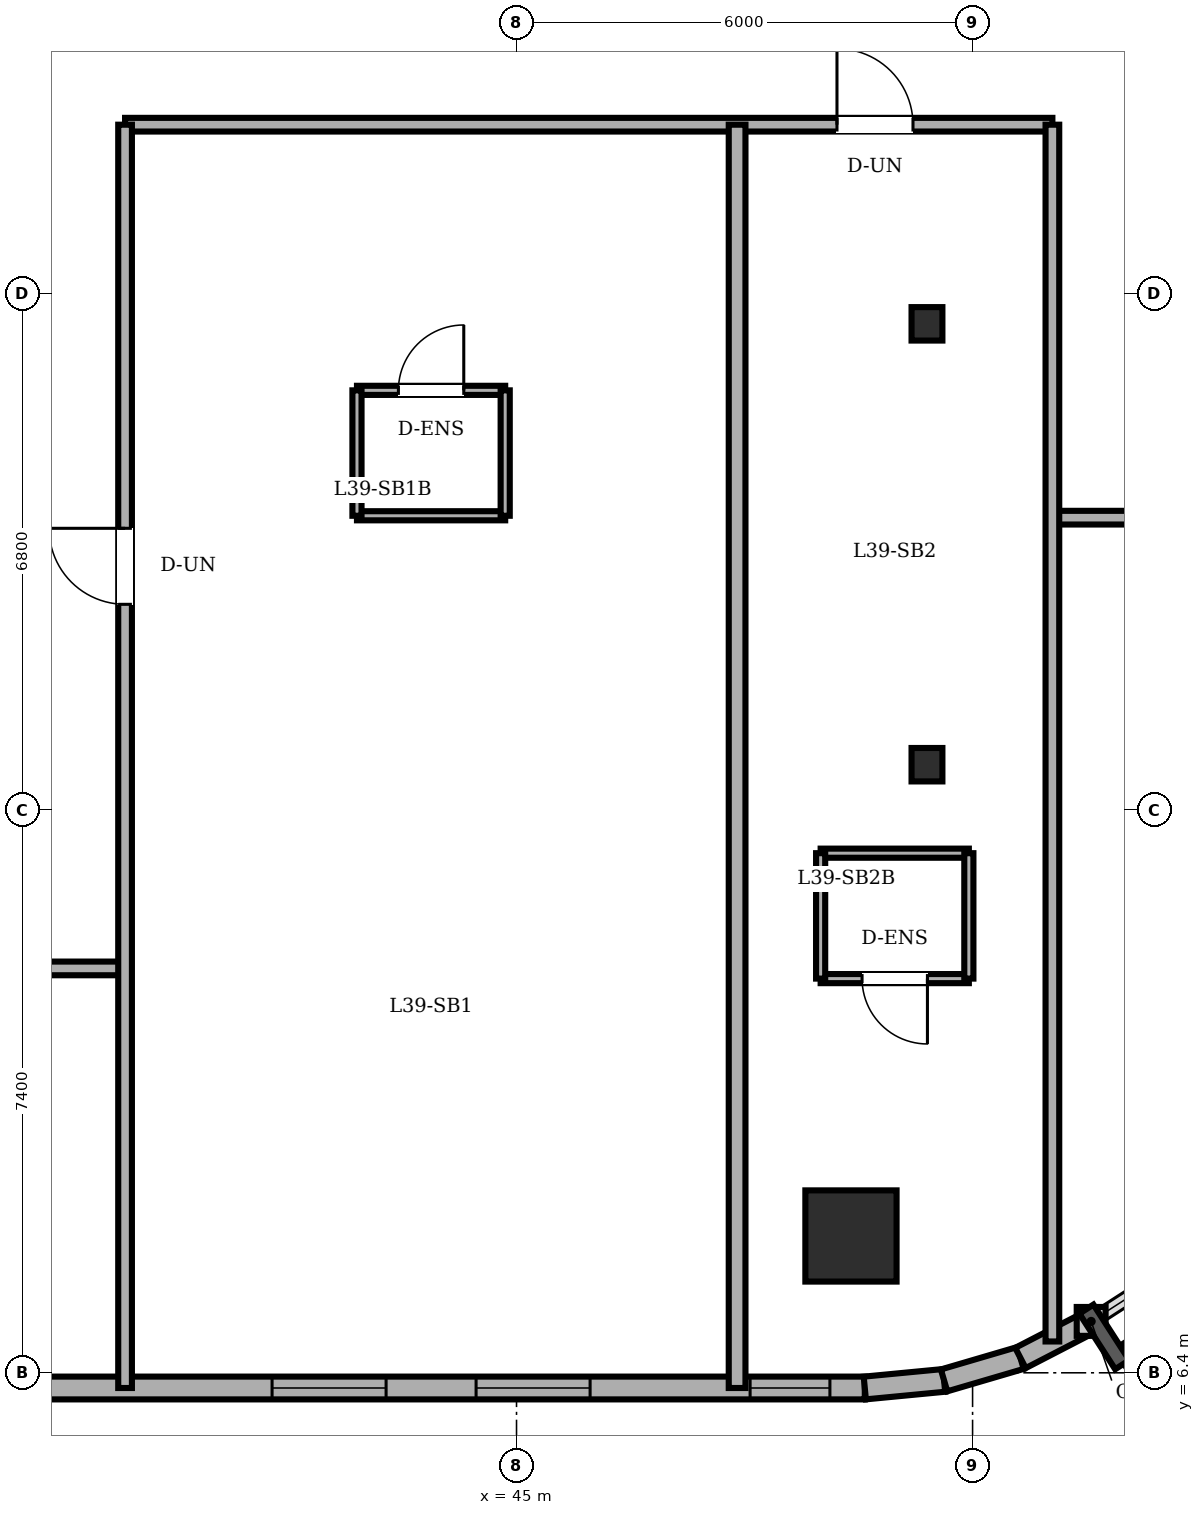
"""IFC4 building model, lengths in metres.
Left out: names, types, materials, properties, quantities, classifications, styles, units other than length and angle.
Written with IfcOpenShell. Run it as: python <this file> out.ifc"""

import sys

from ifc_helpers import new_model, si_unit, direction, frame, frame_2d, origin, origin_2d, place, context, subcontext, project, spatial, rectangle, circle, i_section, extrude, element, fill, save


model = new_model("IFC4")
c1 = context("Model", 3, precision=1e-05, world=origin(), true_north=direction((0.0, 1.0)))
c2 = subcontext(c1, "Body", "Model", "MODEL_VIEW")
j1 = project(units=[si_unit("LENGTHUNIT", "METRE"), si_unit("PLANEANGLEUNIT", "RADIAN")], contexts=[c1])
p1 = place(None, origin())
s1 = spatial("IfcSite", under=j1, at=p1, CompositionType="ELEMENT")
p2 = place(p1, origin())
s2 = spatial("IfcBuilding", under=s1, at=p2, CompositionType="ELEMENT")
p3 = place(p2, frame((0.0, 0.0, 151.0)))
s3 = spatial("IfcBuildingStorey", under=s2, at=p3, CompositionType="ELEMENT", Elevation=151.0)
p4 = place(p3, frame((49.4, 8.2, 0.0), z_axis=(0.0, 0.0, 1.0), x_axis=(1.0, 0.0, 0.0)))
e1 = element("IfcColumn", 1, at=p4, inside=s3, PredefinedType="COLUMN", context=c2, shape_type="SweptSolid", body=[
    extrude(circle(Radius=0.6, at=origin_2d()), origin(), (0.0, 0.0, 1.0), 3.6),
])
for number, where, z_axis, x_axis in (
    (2, (50.4, 14.4, 0.0), (0.0, 0.0, 1.0), (1.0, 0.0, 0.0)),
    (3, (50.4, 20.2, 0.0), (0.0, 0.0, 1.0), (1.0, 0.0, 0.0)),
):
    element("IfcColumn", number, at=place(p3, frame(where, z_axis=z_axis, x_axis=x_axis)), inside=s3, PredefinedType="COLUMN", context=c2, shape_type="SweptSolid", body=[
        extrude(i_section(OverallWidth=0.406, OverallDepth=0.44, WebThickness=0.024, FlangeThickness=0.039, FilletRadius=0.015, at=origin_2d()), origin(), (0.0, 0.0, 1.0), 3.6),
    ])
p5 = place(p3, frame((19.3, 6.2, 0.0), z_axis=(0.0, 0.0, 1.0), x_axis=(1.0, 0.0, 0.0)))
e4 = element("IfcWall", 4, at=p5, inside=s3, PredefinedType="SOLIDWALL", context=c2, shape_type="SweptSolid", body=[
    extrude(rectangle(XDim=30.282, YDim=0.3, at=frame_2d((15.141, 0.0))), origin(), (0.0, 0.0, 1.0), 3.4),
])
p6 = place(p5, frame((5.825, 0.0, 0.0)))
e5 = element("IfcOpeningElement", 5, at=p6, cuts=e4, PredefinedType="OPENING", context=c2, shape_type="SweptSolid", body=[
    extrude(rectangle(XDim=0.95, YDim=2.2, at=frame_2d((0.475, 1.1))), frame((0.0, 0.16, 0.0), z_axis=(0.0, -1.0, 0.0), x_axis=(1.0, 0.0, 0.0)), (0.0, 0.0, 1.0), 0.32),
])
p7 = place(p5, frame((1.25, 0.0, 0.85)))
e6 = element("IfcOpeningElement", 6, at=p7, cuts=e4, PredefinedType="OPENING", context=c2, shape_type="SweptSolid", body=[
    extrude(rectangle(XDim=1.5, YDim=1.55, at=frame_2d((0.75, 0.775))), frame((0.0, 0.16, 0.0), z_axis=(0.0, -1.0, 0.0), x_axis=(1.0, 0.0, 0.0)), (0.0, 0.0, 1.0), 0.32),
])
p8 = place(p5, frame((2.9, 0.0, 0.85)))
e7 = element("IfcOpeningElement", 7, at=p8, cuts=e4, PredefinedType="OPENING", context=c2, shape_type="SweptSolid", body=[
    extrude(rectangle(XDim=1.5, YDim=1.55, at=frame_2d((0.75, 0.775))), frame((0.0, 0.16, 0.0), z_axis=(0.0, -1.0, 0.0), x_axis=(1.0, 0.0, 0.0)), (0.0, 0.0, 1.0), 0.32),
])
p9 = place(p5, frame((12.167, 0.0, 0.85)))
e8 = element("IfcOpeningElement", 8, at=p9, cuts=e4, PredefinedType="OPENING", context=c2, shape_type="SweptSolid", body=[
    extrude(rectangle(XDim=1.5, YDim=1.55, at=frame_2d((0.75, 0.775))), frame((0.0, 0.16, 0.0), z_axis=(0.0, -1.0, 0.0), x_axis=(1.0, 0.0, 0.0)), (0.0, 0.0, 1.0), 0.32),
])
p10 = place(p5, frame((15.983, 0.0, 0.85)))
e9 = element("IfcOpeningElement", 9, at=p10, cuts=e4, PredefinedType="OPENING", context=c2, shape_type="SweptSolid", body=[
    extrude(rectangle(XDim=1.5, YDim=1.55, at=frame_2d((0.75, 0.775))), frame((0.0, 0.16, 0.0), z_axis=(0.0, -1.0, 0.0), x_axis=(1.0, 0.0, 0.0)), (0.0, 0.0, 1.0), 0.32),
])
p11 = place(p5, frame((22.484, 0.0, 0.85)))
e10 = element("IfcOpeningElement", 10, at=p11, cuts=e4, PredefinedType="OPENING", context=c2, shape_type="SweptSolid", body=[
    extrude(rectangle(XDim=1.5, YDim=1.55, at=frame_2d((0.75, 0.775))), frame((0.0, 0.16, 0.0), z_axis=(0.0, -1.0, 0.0), x_axis=(1.0, 0.0, 0.0)), (0.0, 0.0, 1.0), 0.32),
])
p12 = place(p5, frame((25.168, 0.0, 0.85)))
e11 = element("IfcOpeningElement", 11, at=p12, cuts=e4, PredefinedType="OPENING", context=c2, shape_type="SweptSolid", body=[
    extrude(rectangle(XDim=1.5, YDim=1.55, at=frame_2d((0.75, 0.775))), frame((0.0, 0.16, 0.0), z_axis=(0.0, -1.0, 0.0), x_axis=(1.0, 0.0, 0.0)), (0.0, 0.0, 1.0), 0.32),
])
p13 = place(p5, frame((28.773, 0.0, 0.85)))
e12 = element("IfcOpeningElement", 12, at=p13, cuts=e4, PredefinedType="OPENING", context=c2, shape_type="SweptSolid", body=[
    extrude(rectangle(XDim=1.05, YDim=1.55, at=frame_2d((0.525, 0.775))), frame((0.0, 0.16, 0.0), z_axis=(0.0, -1.0, 0.0), x_axis=(1.0, 0.0, 0.0)), (0.0, 0.0, 1.0), 0.32),
])
p14 = place(p3, frame((49.582, 6.2, 0.0), z_axis=(0.0, 0.0, 1.0), x_axis=(0.995426089968, 0.095534807324, 0.0)))
e13 = element("IfcWall", 13, at=p14, inside=s3, PredefinedType="SOLIDWALL", context=c2, shape_type="SweptSolid", body=[
    extrude(rectangle(XDim=1.048, YDim=0.3, at=frame_2d((0.524, 0.0))), origin(), (0.0, 0.0, 1.0), 3.4),
])
p15 = place(p3, frame((50.625, 6.3, 0.0), z_axis=(0.0, 0.0, 1.0), x_axis=(0.959528674476, 0.281610942363, 0.0)))
e14 = element("IfcWall", 14, at=p15, inside=s3, PredefinedType="SOLIDWALL", context=c2, shape_type="SweptSolid", body=[
    extrude(rectangle(XDim=1.047, YDim=0.3, at=frame_2d((0.524, 0.0))), origin(), (0.0, 0.0, 1.0), 3.4),
])
p16 = place(p3, frame((51.63, 6.595, 0.0), z_axis=(0.0, 0.0, 1.0), x_axis=(0.888283247196, 0.459296062198, 0.0)))
e15 = element("IfcWall", 15, at=p16, inside=s3, PredefinedType="SOLIDWALL", context=c2, shape_type="SweptSolid", body=[
    extrude(rectangle(XDim=1.047, YDim=0.3, at=frame_2d((0.523, 0.0))), origin(), (0.0, 0.0, 1.0), 3.4),
])
p17 = place(p3, frame((42.901, 19.325, 0.0), z_axis=(0.0, 0.0, 1.0), x_axis=(1.0, 0.0, 0.0)))
e16 = element("IfcWall", 16, at=p17, inside=s3, PredefinedType="PARTITIONING", context=c2, shape_type="SweptSolid", body=[
    extrude(rectangle(XDim=1.95, YDim=0.12, at=frame_2d((0.975, 0.0))), origin(), (0.0, 0.0, 1.0), 3.4),
])
p18 = place(p17, frame((0.545, 0.0, 0.0)))
e17 = element("IfcOpeningElement", 17, at=p18, cuts=e16, PredefinedType="OPENING", context=c2, shape_type="SweptSolid", body=[
    extrude(rectangle(XDim=0.86, YDim=2.1, at=frame_2d((0.43, 1.05))), frame((0.0, 0.07, 0.0), z_axis=(0.0, -1.0, 0.0), x_axis=(1.0, 0.0, 0.0)), (0.0, 0.0, 1.0), 0.14),
])
p19 = place(p3, frame((44.851, 17.675, 0.0), z_axis=(0.0, 0.0, 1.0), x_axis=(-1.0, 0.0, 0.0)))
e18 = element("IfcWall", 18, at=p19, inside=s3, PredefinedType="PARTITIONING", context=c2, shape_type="SweptSolid", body=[
    extrude(rectangle(XDim=1.95, YDim=0.12, at=frame_2d((0.975, 0.0))), origin(), (0.0, 0.0, 1.0), 3.4),
])
for number, where, z_axis, x_axis in (
    (19, (42.901, 19.325, 0.0), (0.0, 0.0, 1.0), (0.0, -1.0, 0.0)),
    (20, (44.851, 17.675, 0.0), (0.0, 0.0, 1.0), (0.0, 1.0, 0.0)),
):
    element("IfcWall", number, at=place(p3, frame(where, z_axis=z_axis, x_axis=x_axis)), inside=s3, PredefinedType="PARTITIONING", context=c2, shape_type="SweptSolid", body=[
        extrude(rectangle(XDim=1.65, YDim=0.12, at=frame_2d((0.825, 0.0))), origin(), (0.0, 0.0, 1.0), 3.4),
    ])
p20 = place(p3, frame((49.001, 13.236, 0.0), z_axis=(0.0, 0.0, 1.0), x_axis=(1.0, 0.0, 0.0)))
e21 = element("IfcWall", 21, at=p20, inside=s3, PredefinedType="PARTITIONING", context=c2, shape_type="SweptSolid", body=[
    extrude(rectangle(XDim=1.95, YDim=0.12, at=frame_2d((0.975, 0.0))), origin(), (0.0, 0.0, 1.0), 3.4),
])
p21 = place(p3, frame((50.951, 11.586, 0.0), z_axis=(0.0, 0.0, 1.0), x_axis=(-1.0, 0.0, 0.0)))
e22 = element("IfcWall", 22, at=p21, inside=s3, PredefinedType="PARTITIONING", context=c2, shape_type="SweptSolid", body=[
    extrude(rectangle(XDim=1.95, YDim=0.12, at=frame_2d((0.975, 0.0))), origin(), (0.0, 0.0, 1.0), 3.4),
])
p22 = place(p21, frame((0.545, 0.0, 0.0)))
e23 = element("IfcOpeningElement", 23, at=p22, cuts=e22, PredefinedType="OPENING", context=c2, shape_type="SweptSolid", body=[
    extrude(rectangle(XDim=0.86, YDim=2.1, at=frame_2d((0.43, 1.05))), frame((0.0, 0.07, 0.0), z_axis=(0.0, -1.0, 0.0), x_axis=(1.0, 0.0, 0.0)), (0.0, 0.0, 1.0), 0.14),
])
for number, where, z_axis, x_axis in (
    (24, (49.001, 13.236, 0.0), (0.0, 0.0, 1.0), (0.0, -1.0, 0.0)),
    (25, (50.951, 11.586, 0.0), (0.0, 0.0, 1.0), (0.0, 1.0, 0.0)),
):
    element("IfcWall", number, at=place(p3, frame(where, z_axis=z_axis, x_axis=x_axis)), inside=s3, PredefinedType="PARTITIONING", context=c2, shape_type="SweptSolid", body=[
        extrude(rectangle(XDim=1.65, YDim=0.12, at=frame_2d((0.825, 0.0))), origin(), (0.0, 0.0, 1.0), 3.4),
    ])
p23 = place(p3, frame((13.8, 11.72, 0.0), z_axis=(0.0, 0.0, 1.0), x_axis=(1.0, 0.0, 0.0)))
e26 = element("IfcWall", 26, at=p23, inside=s3, PredefinedType="PARTITIONING", context=c2, shape_type="SweptSolid", body=[
    extrude(rectangle(XDim=26.05, YDim=0.18, at=frame_2d((13.025, 0.0))), origin(), (0.0, 0.0, 1.0), 3.4),
])
p24 = place(p23, frame((12.24, 0.0, 0.0)))
e27 = element("IfcOpeningElement", 27, at=p24, cuts=e26, PredefinedType="OPENING", context=c2, shape_type="SweptSolid", body=[
    extrude(rectangle(XDim=0.92, YDim=2.1, at=frame_2d((0.46, 1.05))), frame((0.0, 0.1, 0.0), z_axis=(0.0, -1.0, 0.0), x_axis=(1.0, 0.0, 0.0)), (0.0, 0.0, 1.0), 0.2),
])
p25 = place(p23, frame((5.54, 0.0, 0.0)))
e28 = element("IfcOpeningElement", 28, at=p25, cuts=e26, PredefinedType="OPENING", context=c2, shape_type="SweptSolid", body=[
    extrude(rectangle(XDim=0.92, YDim=2.1, at=frame_2d((0.46, 1.05))), frame((0.0, 0.1, 0.0), z_axis=(0.0, -1.0, 0.0), x_axis=(1.0, 0.0, 0.0)), (0.0, 0.0, 1.0), 0.2),
])
p26 = place(p23, frame((19.605, 0.0, 0.0)))
e29 = element("IfcOpeningElement", 29, at=p26, cuts=e26, PredefinedType="OPENING", context=c2, shape_type="SweptSolid", body=[
    extrude(rectangle(XDim=0.92, YDim=2.1, at=frame_2d((0.46, 1.05))), frame((0.0, 0.1, 0.0), z_axis=(0.0, -1.0, 0.0), x_axis=(1.0, 0.0, 0.0)), (0.0, 0.0, 1.0), 0.2),
])
p27 = place(p3, frame((52.05, 17.65, 0.0), z_axis=(0.0, 0.0, 1.0), x_axis=(1.0, 0.0, 0.0)))
e30 = element("IfcWall", 30, at=p27, inside=s3, PredefinedType="PARTITIONING", context=c2, shape_type="SweptSolid", body=[
    extrude(rectangle(XDim=10.95, YDim=0.18, at=frame_2d((5.475, 0.0))), origin(), (0.0, 0.0, 1.0), 3.4),
])
p28 = place(p27, frame((0.975, 0.0, 0.0)))
e31 = element("IfcOpeningElement", 31, at=p28, cuts=e30, PredefinedType="OPENING", context=c2, shape_type="SweptSolid", body=[
    extrude(rectangle(XDim=0.92, YDim=2.1, at=frame_2d((0.46, 1.05))), frame((0.0, 0.1, 0.0), z_axis=(0.0, -1.0, 0.0), x_axis=(1.0, 0.0, 0.0)), (0.0, 0.0, 1.0), 0.2),
])
p29 = place(p3, frame((39.85, 22.82, 0.0), z_axis=(0.0, 0.0, 1.0), x_axis=(1.0, 0.0, 0.0)))
e32 = element("IfcWall", 32, at=p29, inside=s3, PredefinedType="PARTITIONING", context=c2, shape_type="SweptSolid", body=[
    extrude(rectangle(XDim=12.2, YDim=0.18, at=frame_2d((6.1, 0.0))), origin(), (0.0, 0.0, 1.0), 3.4),
])
p30 = place(p29, frame((9.366, 0.0, 0.0)))
e33 = element("IfcOpeningElement", 33, at=p30, cuts=e32, PredefinedType="OPENING", context=c2, shape_type="SweptSolid", body=[
    extrude(rectangle(XDim=1.0, YDim=2.15, at=frame_2d((0.5, 1.075))), frame((0.0, 0.1, 0.0), z_axis=(0.0, -1.0, 0.0), x_axis=(1.0, 0.0, 0.0)), (0.0, 0.0, 1.0), 0.2),
])
p31 = place(p3, frame((39.85, 6.2, 0.0), z_axis=(0.0, 0.0, 1.0), x_axis=(0.0, 1.0, 0.0)))
e34 = element("IfcWall", 34, at=p31, inside=s3, PredefinedType="PARTITIONING", context=c2, shape_type="SweptSolid", body=[
    extrude(rectangle(XDim=16.62, YDim=0.18, at=frame_2d((8.31, 0.0))), origin(), (0.0, 0.0, 1.0), 3.4),
])
p32 = place(p31, frame((10.31, 0.0, 0.0)))
e35 = element("IfcOpeningElement", 35, at=p32, cuts=e34, PredefinedType="OPENING", context=c2, shape_type="SweptSolid", body=[
    extrude(rectangle(XDim=1.0, YDim=2.15, at=frame_2d((0.5, 1.075))), frame((0.0, 0.1, 0.0), z_axis=(0.0, -1.0, 0.0), x_axis=(1.0, 0.0, 0.0)), (0.0, 0.0, 1.0), 0.2),
])
p33 = place(p3, frame((47.902, 6.2, 0.0), z_axis=(0.0, 0.0, 1.0), x_axis=(0.0, 1.0, 0.0)))
e36 = element("IfcWall", 36, at=p33, inside=s3, PredefinedType="PARTITIONING", context=c2, shape_type="SweptSolid", body=[
    extrude(rectangle(XDim=16.62, YDim=0.22, at=frame_2d((8.31, 0.0))), origin(), (0.0, 0.0, 1.0), 3.4),
])
p34 = place(p3, frame((52.05, 6.812, 0.0), z_axis=(0.0, 0.0, 1.0), x_axis=(0.0, 1.0, 0.0)))
e37 = element("IfcWall", 37, at=p34, inside=s3, PredefinedType="PARTITIONING", context=c2, shape_type="SweptSolid", body=[
    extrude(rectangle(XDim=16.008, YDim=0.18, at=frame_2d((8.004, 0.0))), origin(), (0.0, 0.0, 1.0), 3.4),
])
p35 = place(p11, origin())
e38 = element("IfcWindow", 38, at=p35, inside=s3, PartitioningType="DOUBLE_PANEL_VERTICAL", PredefinedType="WINDOW", context=c2, shape_type="SweptSolid", body=[
    extrude(rectangle(XDim=1.5, YDim=1.55, at=frame_2d((0.75, 0.775))), frame((0.0, 0.03, 0.0), z_axis=(0.0, -1.0, 0.0), x_axis=(1.0, 0.0, 0.0)), (0.0, 0.0, 1.0), 0.06),
])
fill(e10, e38)
p36 = place(p12, origin())
e39 = element("IfcWindow", 39, at=p36, inside=s3, PartitioningType="DOUBLE_PANEL_VERTICAL", PredefinedType="WINDOW", context=c2, shape_type="SweptSolid", body=[
    extrude(rectangle(XDim=1.5, YDim=1.55, at=frame_2d((0.75, 0.775))), frame((0.0, 0.03, 0.0), z_axis=(0.0, -1.0, 0.0), x_axis=(1.0, 0.0, 0.0)), (0.0, 0.0, 1.0), 0.06),
])
fill(e11, e39)
p37 = place(p13, origin())
e40 = element("IfcWindow", 40, at=p37, inside=s3, PartitioningType="SINGLE_PANEL", PredefinedType="WINDOW", context=c2, shape_type="SweptSolid", body=[
    extrude(rectangle(XDim=1.05, YDim=1.55, at=frame_2d((0.525, 0.775))), frame((0.0, 0.03, 0.0), z_axis=(0.0, -1.0, 0.0), x_axis=(1.0, 0.0, 0.0)), (0.0, 0.0, 1.0), 0.06),
])
fill(e12, e40)
p38 = place(p18, origin())
e41 = element("IfcDoor", 41, at=p38, inside=s3, OperationType="SINGLE_SWING_RIGHT", PredefinedType="DOOR", context=c2, shape_type="SweptSolid", body=[
    extrude(rectangle(XDim=0.86, YDim=2.1, at=frame_2d((0.43, 1.05))), frame((0.0, 0.025, 0.0), z_axis=(0.0, -1.0, 0.0), x_axis=(1.0, 0.0, 0.0)), (0.0, 0.0, 1.0), 0.05),
])
fill(e17, e41)
p39 = place(p22, origin())
e42 = element("IfcDoor", 42, at=p39, inside=s3, OperationType="SINGLE_SWING_LEFT", PredefinedType="DOOR", context=c2, shape_type="SweptSolid", body=[
    extrude(rectangle(XDim=0.86, YDim=2.1, at=frame_2d((0.43, 1.05))), frame((0.0, 0.025, 0.0), z_axis=(0.0, -1.0, 0.0), x_axis=(1.0, 0.0, 0.0)), (0.0, 0.0, 1.0), 0.05),
])
fill(e23, e42)
p40 = place(p32, origin())
e43 = element("IfcDoor", 43, at=p40, inside=s3, OperationType="SINGLE_SWING_RIGHT", PredefinedType="DOOR", context=c2, shape_type="SweptSolid", body=[
    extrude(rectangle(XDim=1.0, YDim=2.15, at=frame_2d((0.5, 1.075))), frame((0.0, 0.025, 0.0), z_axis=(0.0, -1.0, 0.0), x_axis=(1.0, 0.0, 0.0)), (0.0, 0.0, 1.0), 0.05),
])
fill(e35, e43)
p41 = place(p30, origin())
e44 = element("IfcDoor", 44, at=p41, inside=s3, OperationType="SINGLE_SWING_LEFT", PredefinedType="DOOR", context=c2, shape_type="SweptSolid", body=[
    extrude(rectangle(XDim=1.0, YDim=2.15, at=frame_2d((0.5, 1.075))), frame((0.0, 0.025, 0.0), z_axis=(0.0, -1.0, 0.0), x_axis=(1.0, 0.0, 0.0)), (0.0, 0.0, 1.0), 0.05),
])
fill(e33, e44)
save(model, sys.argv[1])
